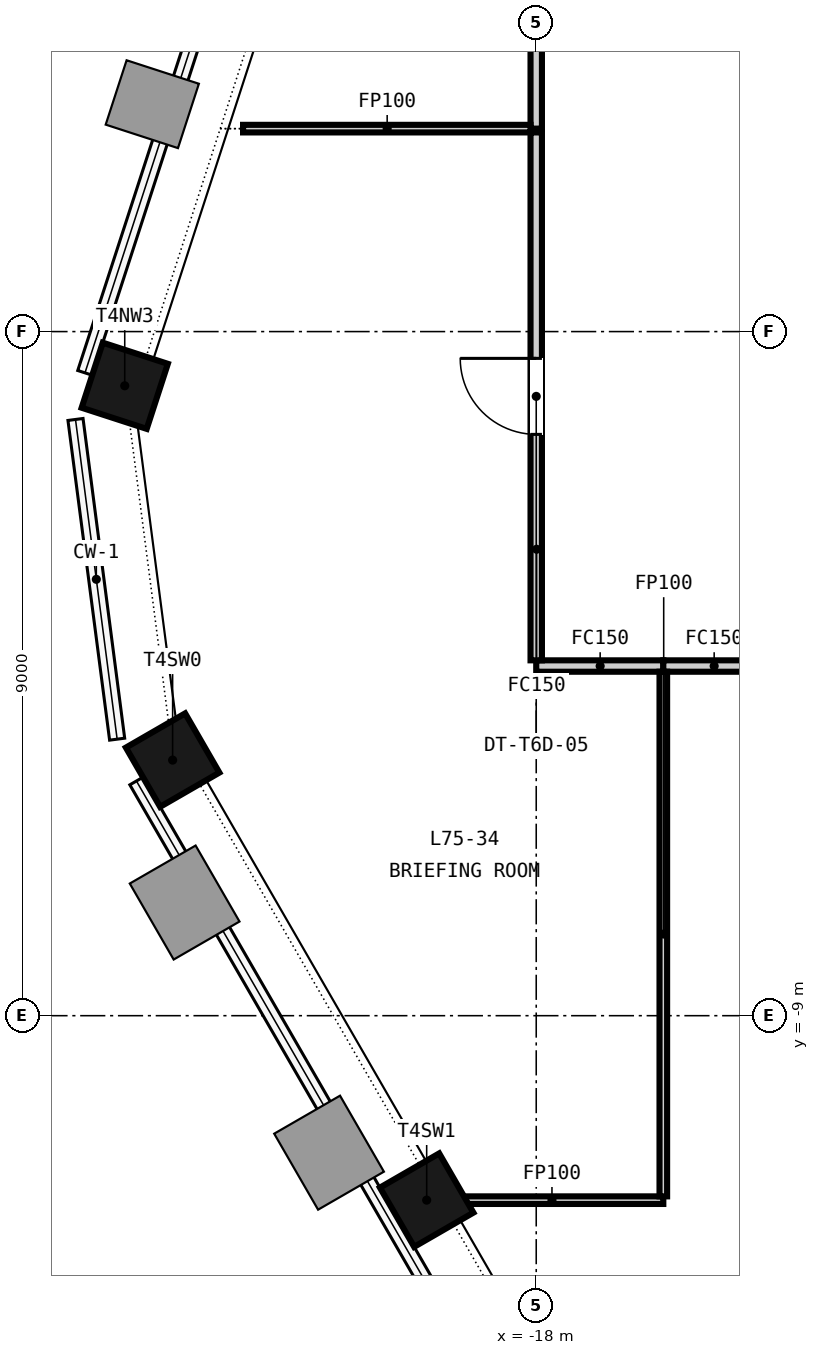
"""IFC4 building model, lengths in metres.
Left out: names, types, materials, properties, quantities, classifications, styles, units other than length and angle.
Written with IfcOpenShell. Run it as: python <this file> out.ifc"""

import sys

from ifc_helpers import new_model, si_unit, direction, frame, frame_2d, origin, origin_2d, place, context, subcontext, project, spatial, rectangle, extrude, element, fill, save


model = new_model("IFC4")
c1 = context("Model", 3, precision=1e-05, world=origin(), true_north=direction((0.0, 1.0)))
c2 = subcontext(c1, "Body", "Model", "MODEL_VIEW")
j1 = project(units=[si_unit("LENGTHUNIT", "METRE"), si_unit("PLANEANGLEUNIT", "RADIAN")], contexts=[c1])
p1 = place(None, origin())
s1 = spatial("IfcSite", under=j1, at=p1, CompositionType="ELEMENT")
p2 = place(p1, origin())
s2 = spatial("IfcBuilding", under=s1, at=p2, CompositionType="ELEMENT")
p3 = place(p2, frame((0.0, 0.0, 293.8)))
s3 = spatial("IfcBuildingStorey", under=s2, at=p3, CompositionType="ELEMENT", Elevation=293.8)
for number, where, z_axis, x_axis in (
    (1, (-23.414, -0.713, -0.15), (0.0, 0.0, 1.0), (-0.309, -0.951, 0.0)),
    (2, (-22.784, -5.638, -0.15), (0.0, 0.0, 1.0), (0.5, -0.866, 0.0)),
    (3, (-19.441, -11.427, -0.15), (0.0, 0.0, 1.0), (0.5, -0.866, 0.0)),
):
    element("IfcColumn", number, at=place(p3, frame(where, z_axis=z_axis, x_axis=x_axis)), inside=s3, PredefinedType="COLUMN", context=c2, shape_type="SweptSolid", body=[
        extrude(rectangle(XDim=0.9, YDim=0.9, at=origin_2d()), origin(), (0.0, 0.0, 1.0), 3.65),
    ])
p4 = place(p3, frame((-16.328, -4.4, 0.0), z_axis=(0.0, 0.0, 1.0), x_axis=(-1.0, 0.0, 0.0)))
e4 = element("IfcWall", 4, at=p4, inside=s3, PredefinedType="PARTITIONING", context=c2, shape_type="SweptSolid", body=[
    extrude(rectangle(XDim=1.672, YDim=0.15, at=frame_2d((0.836, 0.0))), origin(), (0.0, 0.0, 1.0), 2.751),
])
p5 = place(p3, frame((-15.0, -4.4, 0.0), z_axis=(0.0, 0.0, 1.0), x_axis=(-1.0, 0.0, 0.0)))
e5 = element("IfcWall", 5, at=p5, inside=s3, PredefinedType="PARTITIONING", context=c2, shape_type="SweptSolid", body=[
    extrude(rectangle(XDim=1.328, YDim=0.15, at=frame_2d((0.664, 0.0))), origin(), (0.0, 0.0, 1.0), 2.751),
])
p6 = place(p3, frame((-18.0, 2.67, 0.0), z_axis=(0.0, 0.0, 1.0), x_axis=(0.0, 1.0, 0.0)))
e6 = element("IfcWall", 6, at=p6, inside=s3, PredefinedType="PARTITIONING", context=c2, shape_type="SweptSolid", body=[
    extrude(rectangle(XDim=6.645, YDim=0.15, at=frame_2d((3.323, 0.0))), origin(), (0.0, 0.0, 1.0), 2.751),
])
p7 = place(p3, frame((-21.857, 2.67, 0.0), z_axis=(0.0, 0.0, 1.0), x_axis=(1.0, 0.0, 0.0)))
e7 = element("IfcWall", 7, at=p7, inside=s3, PredefinedType="PARTITIONING", context=c2, shape_type="SweptSolid", body=[
    extrude(rectangle(XDim=3.782, YDim=0.1, at=frame_2d((1.891, 0.0))), origin(), (0.0, 0.0, 1.0), 2.751),
])
p8 = place(p3, frame((-18.0, -4.325, 0.0), z_axis=(0.0, 0.0, 1.0), x_axis=(0.0, 1.0, 0.0)))
e8 = element("IfcWall", 8, at=p8, inside=s3, PredefinedType="PARTITIONING", context=c2, shape_type="SweptSolid", body=[
    extrude(rectangle(XDim=6.945, YDim=0.15, at=frame_2d((3.473, 0.0))), origin(), (0.0, 0.0, 1.0), 2.751),
])
p9 = place(p8, frame((2.972, 0.0, 0.0)))
e9 = element("IfcOpeningElement", 9, at=p9, cuts=e8, PredefinedType="OPENING", context=c2, shape_type="SweptSolid", body=[
    extrude(rectangle(XDim=1.0, YDim=2.1, at=frame_2d((0.5, 1.05))), frame((0.0, 0.085, 0.0), z_axis=(0.0, -1.0, 0.0), x_axis=(1.0, 0.0, 0.0)), (0.0, 0.0, 1.0), 0.17),
])
p10 = place(p3, frame((-19.268, -11.427, 0.0), z_axis=(0.0, 0.0, 1.0), x_axis=(1.0, 0.0, 0.0)))
e10 = element("IfcWall", 10, at=p10, inside=s3, PredefinedType="PARTITIONING", context=c2, shape_type="SweptSolid", body=[
    extrude(rectangle(XDim=2.94, YDim=0.1, at=frame_2d((1.47, 0.0))), origin(), (0.0, 0.0, 1.0), 2.751),
])
p11 = place(p3, frame((-16.328, -11.377, 0.0), z_axis=(0.0, 0.0, 1.0), x_axis=(0.0, 1.0, 0.0)))
e11 = element("IfcWall", 11, at=p11, inside=s3, PredefinedType="PARTITIONING", context=c2, shape_type="SweptSolid", body=[
    extrude(rectangle(XDim=6.902, YDim=0.1, at=frame_2d((3.451, 0.0))), origin(), (0.0, 0.0, 1.0), 2.751),
])
p12 = place(p9, origin())
e12 = element("IfcDoor", 12, at=p12, inside=s3, OperationType="SINGLE_SWING_RIGHT", PredefinedType="DOOR", context=c2, shape_type="SweptSolid", body=[
    extrude(rectangle(XDim=1.0, YDim=2.1, at=frame_2d((0.5, 1.05))), frame((0.0, 0.025, 0.0), z_axis=(0.0, -1.0, 0.0), x_axis=(1.0, 0.0, 0.0)), (0.0, 0.0, 1.0), 0.05),
])
fill(e9, e12)
save(model, sys.argv[1])
